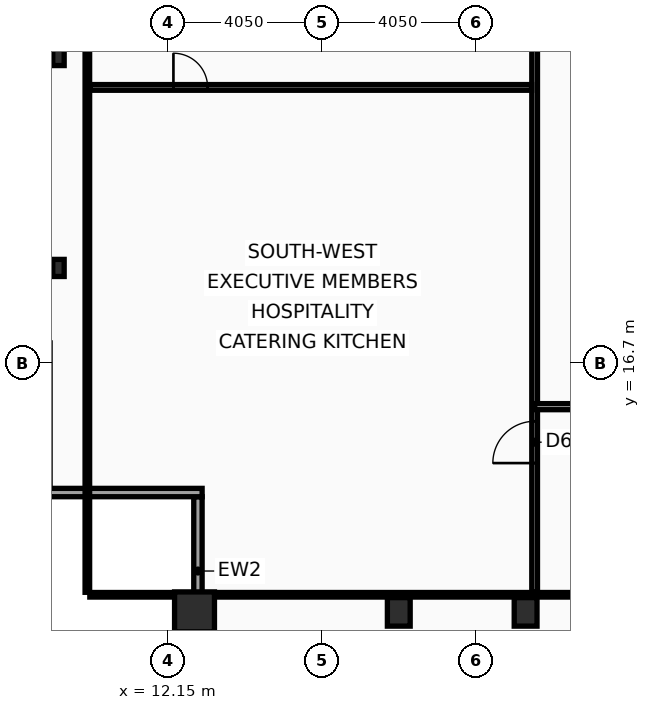
"""IFC4 building model, lengths in metres.
Left out: names, types, materials, properties, quantities, classifications, styles, units other than length and angle.
Written with IfcOpenShell. Run it as: python <this file> out.ifc"""

import sys

from ifc_helpers import new_model, si_unit, direction, frame, frame_2d, origin, origin_2d, place, context, subcontext, project, spatial, rectangle, hollow_rectangle, i_section, extrude, element, fill, save


model = new_model("IFC4")
c1 = context("Model", 3, precision=1e-05, world=origin(), true_north=direction((0.0, 1.0)))
c2 = subcontext(c1, "Body", "Model", "MODEL_VIEW")
j1 = project(units=[si_unit("LENGTHUNIT", "METRE"), si_unit("PLANEANGLEUNIT", "RADIAN")], contexts=[c1])
p1 = place(None, origin())
s1 = spatial("IfcSite", under=j1, at=p1, CompositionType="ELEMENT")
p2 = place(p1, origin())
s2 = spatial("IfcBuilding", under=s1, at=p2, CompositionType="ELEMENT")
p3 = place(p2, frame((0.0, 0.0, 277.0)))
s3 = spatial("IfcBuildingStorey", under=s2, at=p3, CompositionType="ELEMENT", Elevation=277.0)
p4 = place(p3, frame((12.85, 10.15, 0.0), z_axis=(0.0, 0.0, 1.0), x_axis=(1.0, 0.0, 0.0)))
e1 = element("IfcColumn", 1, at=p4, inside=s3, PredefinedType="COLUMN", context=c2, shape_type="SweptSolid", body=[
    extrude(hollow_rectangle(XDim=1.05, YDim=1.05, WallThickness=0.055, at=origin_2d()), origin(), (0.0, 0.0, 1.0), 3.6),
])
for number, where, z_axis, x_axis in (
    (2, (18.225, 10.15, 0.0), (0.0, 0.0, 1.0), (1.0, 0.0, 0.0)),
    (3, (21.562, 10.15, 0.0), (0.0, 0.0, 1.0), (1.0, 0.0, 0.0)),
):
    element("IfcColumn", number, at=place(p3, frame(where, z_axis=z_axis, x_axis=x_axis)), inside=s3, PredefinedType="COLUMN", context=c2, shape_type="SweptSolid", body=[
        extrude(hollow_rectangle(XDim=0.6, YDim=0.75, WallThickness=0.045, at=origin_2d()), origin(), (0.0, 0.0, 1.0), 3.6),
    ])
for number, where, z_axis, x_axis in (
    (4, (9.27, 19.2, 0.0), (0.0, 0.0, 1.0), (1.0, 0.0, 0.0)),
    (5, (9.27, 24.75, 0.0), (0.0, 0.0, 1.0), (1.0, 0.0, 0.0)),
):
    element("IfcColumn", number, at=place(p3, frame(where, z_axis=z_axis, x_axis=x_axis)), inside=s3, PredefinedType="COLUMN", context=c2, shape_type="SweptSolid", body=[
        extrude(i_section(OverallWidth=0.3, OverallDepth=0.45, WebThickness=0.014, FlangeThickness=0.026, at=origin_2d()), origin(), (0.0, 0.0, 1.0), 3.6),
    ])
p5 = place(p3, frame((12.94, 9.27, 0.0), z_axis=(0.0, 0.0, 1.0), x_axis=(0.0, 1.0, 0.0)))
e6 = element("IfcWall", 6, at=p5, inside=s3, PredefinedType="SOLIDWALL", context=c2, shape_type="SweptSolid", body=[
    extrude(rectangle(XDim=3.91, YDim=0.22, at=frame_2d((1.955, 0.0))), origin(), (0.0, 0.0, 1.0), 2.88),
])
p6 = place(p3, frame((13.05, 13.29, 0.0), z_axis=(0.0, 0.0, 1.0), x_axis=(-1.0, 0.0, 0.0)))
e7 = element("IfcWall", 7, at=p6, inside=s3, PredefinedType="SOLIDWALL", context=c2, shape_type="SweptSolid", body=[
    extrude(rectangle(XDim=4.22, YDim=0.22, at=frame_2d((2.11, 0.0))), origin(), (0.0, 0.0, 1.0), 2.88),
])
p7 = place(p3, frame((21.8, 10.665, 0.0), z_axis=(0.0, 0.0, 1.0), x_axis=(0.0, 1.0, 0.0)))
e8 = element("IfcWall", 8, at=p7, inside=s3, PredefinedType="PARTITIONING", context=c2, shape_type="SweptSolid", body=[
    extrude(rectangle(XDim=24.955, YDim=0.15, at=frame_2d((12.478, 0.0))), origin(), (0.0, 0.0, 1.0), 3.03),
])
p8 = place(p7, frame((3.4, 0.0, 0.0)))
e9 = element("IfcOpeningElement", 9, at=p8, cuts=e8, PredefinedType="OPENING", context=c2, shape_type="SweptSolid", body=[
    extrude(rectangle(XDim=1.1, YDim=2.1, at=frame_2d((0.55, 1.05))), frame((0.0, 0.085, 0.0), z_axis=(0.0, -1.0, 0.0), x_axis=(1.0, 0.0, 0.0)), (0.0, 0.0, 1.0), 0.17),
])
p9 = place(p3, frame((10.095, 23.95, 0.0), z_axis=(0.0, 0.0, 1.0), x_axis=(1.0, 0.0, 0.0)))
e10 = element("IfcWall", 10, at=p9, inside=s3, PredefinedType="PARTITIONING", context=c2, shape_type="SweptSolid", body=[
    extrude(rectangle(XDim=11.625, YDim=0.15, at=frame_2d((5.812, 0.0))), origin(), (0.0, 0.0, 1.0), 2.78),
])
p10 = place(p9, frame((2.2, 0.0, 0.0)))
e11 = element("IfcOpeningElement", 11, at=p10, cuts=e10, PredefinedType="OPENING", context=c2, shape_type="SweptSolid", body=[
    extrude(rectangle(XDim=0.9, YDim=2.05, at=frame_2d((0.45, 1.025))), frame((0.0, 0.085, 0.0), z_axis=(0.0, -1.0, 0.0), x_axis=(1.0, 0.0, 0.0)), (0.0, 0.0, 1.0), 0.17),
])
p11 = place(p3, frame((21.8, 15.55, 0.0), z_axis=(0.0, 0.0, 1.0), x_axis=(1.0, 0.0, 0.0)))
e12 = element("IfcWall", 12, at=p11, inside=s3, PredefinedType="PARTITIONING", context=c2, shape_type="SweptSolid", body=[
    extrude(rectangle(XDim=7.576, YDim=0.16, at=frame_2d((3.788, 0.0))), origin(), (0.0, 0.0, 1.0), 2.78),
])
p12 = place(p11, frame((3.432, 0.0, 0.0)))
e13 = element("IfcOpeningElement", 13, at=p12, cuts=e12, PredefinedType="OPENING", context=c2, shape_type="SweptSolid", body=[
    extrude(rectangle(XDim=1.0, YDim=2.05, at=frame_2d((0.5, 1.025))), frame((0.0, 0.09, 0.0), z_axis=(0.0, -1.0, 0.0), x_axis=(1.0, 0.0, 0.0)), (0.0, 0.0, 1.0), 0.18),
])
p13 = place(p3, frame((10.03, 10.665, 0.0), z_axis=(0.0, 0.0, 1.0), x_axis=(0.0, 1.0, 0.0)))
e14 = element("IfcWall", 14, at=p13, inside=s3, PredefinedType="PARTITIONING", context=c2, shape_type="SweptSolid", body=[
    extrude(rectangle(XDim=42.11, YDim=0.12, at=frame_2d((21.055, 0.0))), origin(), (0.0, 0.0, 1.0), 2.78),
])
p14 = place(p3, frame((10.095, 10.6, 0.0), z_axis=(0.0, 0.0, 1.0), x_axis=(1.0, 0.0, 0.0)))
e15 = element("IfcWall", 15, at=p14, inside=s3, PredefinedType="PARTITIONING", context=c2, shape_type="SweptSolid", body=[
    extrude(rectangle(XDim=52.71, YDim=0.12, at=frame_2d((26.355, 0.0))), origin(), (0.0, 0.0, 1.0), 2.78),
])
p15 = place(p8, origin())
e16 = element("IfcDoor", 16, at=p15, inside=s3, OperationType="SINGLE_SWING_LEFT", PredefinedType="DOOR", context=c2, shape_type="SweptSolid", body=[
    extrude(rectangle(XDim=1.1, YDim=2.1, at=frame_2d((0.55, 1.05))), frame((0.0, 0.025, 0.0), z_axis=(0.0, -1.0, 0.0), x_axis=(1.0, 0.0, 0.0)), (0.0, 0.0, 1.0), 0.05),
])
fill(e9, e16)
p16 = place(p10, origin())
e17 = element("IfcDoor", 17, at=p16, inside=s3, OperationType="SINGLE_SWING_LEFT", PredefinedType="DOOR", context=c2, shape_type="SweptSolid", body=[
    extrude(rectangle(XDim=0.9, YDim=2.05, at=frame_2d((0.45, 1.025))), frame((0.0, 0.025, 0.0), z_axis=(0.0, -1.0, 0.0), x_axis=(1.0, 0.0, 0.0)), (0.0, 0.0, 1.0), 0.05),
])
fill(e11, e17)
save(model, sys.argv[1])
